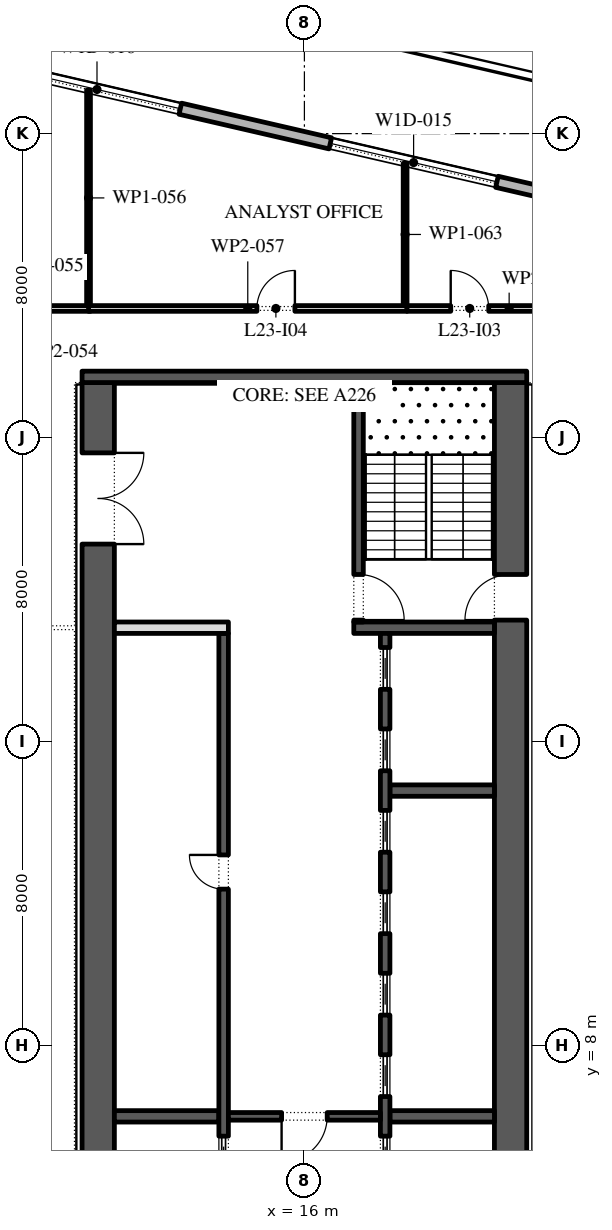
"""IFC4 building model, lengths in metres.
Left out: names, types, materials, properties, quantities, classifications, styles, units other than length and angle.
Written with IfcOpenShell. Run it as: python <this file> out.ifc"""

import sys

from ifc_helpers import new_model, si_unit, direction, frame, frame_2d, origin, place, context, subcontext, project, spatial, rectangle, extrude, element, fill, save


model = new_model("IFC4")
c1 = context("Model", 3, precision=1e-05, world=origin(), true_north=direction((0.0, 1.0)))
c2 = subcontext(c1, "Body", "Model", "MODEL_VIEW")
j1 = project(units=[si_unit("LENGTHUNIT", "METRE"), si_unit("PLANEANGLEUNIT", "RADIAN")], contexts=[c1])
p1 = place(None, origin())
s1 = spatial("IfcSite", under=j1, at=p1, CompositionType="ELEMENT")
p2 = place(p1, origin())
s2 = spatial("IfcBuilding", under=s1, at=p2, CompositionType="ELEMENT")
p3 = place(p2, frame((0.0, 0.0, 109.8)))
s3 = spatial("IfcBuildingStorey", under=s2, at=p3, CompositionType="ELEMENT", Elevation=109.8)
p4 = place(p3, frame((31.078, 28.421, 0.0), z_axis=(0.0, 0.0, 1.0), x_axis=(-0.974370456532, 0.224949357493, 0.0)))
e1 = element("IfcWall", 1, at=p4, inside=s3, PredefinedType="STANDARD", context=c2, shape_type="SweptSolid", body=[
    extrude(rectangle(XDim=51.0, YDim=0.3, at=frame_2d((25.5, 0.0))), origin(), (0.0, 0.0, 1.0), 4.0),
])
p5 = place(p4, frame((1.875, 0.0, 0.45)))
e2 = element("IfcOpeningElement", 2, at=p5, cuts=e1, PredefinedType="OPENING", context=c2, shape_type="SweptSolid", body=[
    extrude(rectangle(XDim=4.5, YDim=3.05, at=frame_2d((2.25, 1.525))), frame((0.0, 0.16, 0.0), z_axis=(0.0, -1.0, 0.0), x_axis=(1.0, 0.0, 0.0)), (0.0, 0.0, 1.0), 0.32),
])
p6 = place(p4, frame((10.275, 0.0, 0.45)))
e3 = element("IfcOpeningElement", 3, at=p6, cuts=e1, PredefinedType="OPENING", context=c2, shape_type="SweptSolid", body=[
    extrude(rectangle(XDim=4.5, YDim=2.875, at=frame_2d((2.25, 1.438))), frame((0.0, 0.16, 0.0), z_axis=(0.0, -1.0, 0.0), x_axis=(1.0, 0.0, 0.0)), (0.0, 0.0, 1.0), 0.32),
])
p7 = place(p4, frame((18.825, 0.0, 0.45)))
e4 = element("IfcOpeningElement", 4, at=p7, cuts=e1, PredefinedType="OPENING", context=c2, shape_type="SweptSolid", body=[
    extrude(rectangle(XDim=4.5, YDim=2.875, at=frame_2d((2.25, 1.438))), frame((0.0, 0.16, 0.0), z_axis=(0.0, -1.0, 0.0), x_axis=(1.0, 0.0, 0.0)), (0.0, 0.0, 1.0), 0.32),
])
p8 = place(p4, frame((27.075, 0.0, 0.0)))
e5 = element("IfcOpeningElement", 5, at=p8, cuts=e1, PredefinedType="OPENING", context=c2, shape_type="SweptSolid", body=[
    extrude(rectangle(XDim=2.4, YDim=3.2, at=frame_2d((1.2, 1.6))), frame((0.0, 0.16, 0.0), z_axis=(0.0, -1.0, 0.0), x_axis=(1.0, 0.0, 0.0)), (0.0, 0.0, 1.0), 0.32),
])
p9 = place(p4, frame((35.925, 0.0, 0.45)))
e6 = element("IfcOpeningElement", 6, at=p9, cuts=e1, PredefinedType="OPENING", context=c2, shape_type="SweptSolid", body=[
    extrude(rectangle(XDim=4.5, YDim=2.675, at=frame_2d((2.25, 1.337))), frame((0.0, 0.16, 0.0), z_axis=(0.0, -1.0, 0.0), x_axis=(1.0, 0.0, 0.0)), (0.0, 0.0, 1.0), 0.32),
])
p10 = place(p4, frame((44.475, 0.0, 0.45)))
e7 = element("IfcOpeningElement", 7, at=p10, cuts=e1, PredefinedType="OPENING", context=c2, shape_type="SweptSolid", body=[
    extrude(rectangle(XDim=4.5, YDim=3.05, at=frame_2d((2.25, 1.525))), frame((0.0, 0.16, 0.0), z_axis=(0.0, -1.0, 0.0), x_axis=(1.0, 0.0, 0.0)), (0.0, 0.0, 1.0), 0.32),
])
p11 = place(p3, frame((21.425, -2.45, 0.0), z_axis=(0.0, 0.0, 1.0), x_axis=(0.0, 1.0, 0.0)))
e8 = element("IfcWall", 8, at=p11, inside=s3, PredefinedType="SHEAR", context=c2, shape_type="SweptSolid", body=[
    extrude(rectangle(XDim=27.9, YDim=0.85, at=frame_2d((13.95, 0.0))), origin(), (0.0, 0.0, 1.0), 4.0),
])
p12 = place(p11, frame((5.05, 0.0, 0.0)))
e9 = element("IfcOpeningElement", 9, at=p12, cuts=e8, PredefinedType="OPENING", context=c2, shape_type="SweptSolid", body=[
    extrude(rectangle(XDim=1.2, YDim=2.1, at=frame_2d((0.6, 1.05))), frame((0.0, 0.435, 0.0), z_axis=(0.0, -1.0, 0.0), x_axis=(1.0, 0.0, 0.0)), (0.0, 0.0, 1.0), 0.87),
])
p13 = place(p11, frame((21.65, 0.0, 0.0)))
e10 = element("IfcOpeningElement", 10, at=p13, cuts=e8, PredefinedType="OPENING", context=c2, shape_type="SweptSolid", body=[
    extrude(rectangle(XDim=1.2, YDim=2.1, at=frame_2d((0.6, 1.05))), frame((0.0, 0.435, 0.0), z_axis=(0.0, -1.0, 0.0), x_axis=(1.0, 0.0, 0.0)), (0.0, 0.0, 1.0), 0.87),
])
p14 = place(p3, frame((10.575, -2.45, 0.0), z_axis=(0.0, 0.0, 1.0), x_axis=(0.0, 1.0, 0.0)))
e11 = element("IfcWall", 11, at=p14, inside=s3, PredefinedType="SHEAR", context=c2, shape_type="SweptSolid", body=[
    extrude(rectangle(XDim=27.9, YDim=0.85, at=frame_2d((13.95, 0.0))), origin(), (0.0, 0.0, 1.0), 4.0),
])
p15 = place(p14, frame((23.65, 0.0, 0.0)))
e12 = element("IfcOpeningElement", 12, at=p15, cuts=e11, PredefinedType="OPENING", context=c2, shape_type="SweptSolid", body=[
    extrude(rectangle(XDim=2.4, YDim=2.1, at=frame_2d((1.2, 1.05))), frame((0.0, 0.435, 0.0), z_axis=(0.0, -1.0, 0.0), x_axis=(1.0, 0.0, 0.0)), (0.0, 0.0, 1.0), 0.87),
])
p16 = place(p14, frame((1.087, 0.0, 0.0)))
e13 = element("IfcOpeningElement", 13, at=p16, cuts=e11, PredefinedType="OPENING", context=c2, shape_type="SweptSolid", body=[
    extrude(rectangle(XDim=0.9, YDim=2.1, at=frame_2d((0.45, 1.05))), frame((0.0, 0.435, 0.0), z_axis=(0.0, -1.0, 0.0), x_axis=(1.0, 0.0, 0.0)), (0.0, 0.0, 1.0), 0.87),
])
p17 = place(p14, frame((4.262, 0.0, 0.0)))
e14 = element("IfcOpeningElement", 14, at=p17, cuts=e11, PredefinedType="OPENING", context=c2, shape_type="SweptSolid", body=[
    extrude(rectangle(XDim=1.0, YDim=2.1, at=frame_2d((0.5, 1.05))), frame((0.0, 0.435, 0.0), z_axis=(0.0, -1.0, 0.0), x_axis=(1.0, 0.0, 0.0)), (0.0, 0.0, 1.0), 0.87),
])
p18 = place(p3, frame((10.15, 25.6, 0.0), z_axis=(0.0, 0.0, 1.0), x_axis=(1.0, 0.0, 0.0)))
e15 = element("IfcWall", 15, at=p18, inside=s3, PredefinedType="SHEAR", context=c2, shape_type="SweptSolid", body=[
    extrude(rectangle(XDim=11.7, YDim=0.3, at=frame_2d((5.85, 0.0))), origin(), (0.0, 0.0, 1.0), 4.0),
])
p19 = place(p3, frame((17.3, 19.0, 0.0), z_axis=(0.0, 0.0, 1.0), x_axis=(1.0, 0.0, 0.0)))
e16 = element("IfcWall", 16, at=p19, inside=s3, PredefinedType="SHEAR", context=c2, shape_type="SweptSolid", body=[
    extrude(rectangle(XDim=3.7, YDim=0.3, at=frame_2d((1.85, 0.0))), origin(), (0.0, 0.0, 1.0), 4.0),
])
p20 = place(p3, frame((17.425, 19.15, 0.0), z_axis=(0.0, 0.0, 1.0), x_axis=(0.0, 1.0, 0.0)))
e17 = element("IfcWall", 17, at=p20, inside=s3, PredefinedType="SHEAR", context=c2, shape_type="SweptSolid", body=[
    extrude(rectangle(XDim=6.3, YDim=0.25, at=frame_2d((3.15, 0.0))), origin(), (0.0, 0.0, 1.0), 4.0),
])
p21 = place(p20, frame((0.05, 0.0, 0.0)))
e18 = element("IfcOpeningElement", 18, at=p21, cuts=e17, PredefinedType="OPENING", context=c2, shape_type="SweptSolid", body=[
    extrude(rectangle(XDim=1.2, YDim=2.1, at=frame_2d((0.6, 1.05))), frame((0.0, 0.135, 0.0), z_axis=(0.0, -1.0, 0.0), x_axis=(1.0, 0.0, 0.0)), (0.0, 0.0, 1.0), 0.27),
])
for number, where, z_axis, x_axis in (
    (19, (18.25, 6.143, 0.0), (0.0, 0.0, 1.0), (1.0, 0.0, 0.0)),
    (20, (18.25, 14.714, 0.0), (0.0, 0.0, 1.0), (1.0, 0.0, 0.0)),
):
    element("IfcWall", number, at=place(p3, frame(where, z_axis=z_axis, x_axis=x_axis)), inside=s3, PredefinedType="SHEAR", context=c2, shape_type="SweptSolid", body=[
        extrude(rectangle(XDim=2.75, YDim=0.3, at=frame_2d((1.375, 0.0))), origin(), (0.0, 0.0, 1.0), 4.0),
    ])
p22 = place(p3, frame((18.125, 4.15, 0.0), z_axis=(0.0, 0.0, 1.0), x_axis=(0.0, 1.0, 0.0)))
e21 = element("IfcWall", 21, at=p22, inside=s3, PredefinedType="SHEAR", context=c2, shape_type="SweptSolid", body=[
    extrude(rectangle(XDim=14.7, YDim=0.25, at=frame_2d((7.35, 0.0))), origin(), (0.0, 0.0, 1.0), 4.0),
])
p23 = place(p22, frame((0.371, 0.0, 0.0)))
e22 = element("IfcOpeningElement", 22, at=p23, cuts=e21, PredefinedType="OPENING", context=c2, shape_type="SweptSolid", body=[
    extrude(rectangle(XDim=1.1, YDim=2.1, at=frame_2d((0.55, 1.05))), frame((0.0, 0.135, 0.0), z_axis=(0.0, -1.0, 0.0), x_axis=(1.0, 0.0, 0.0)), (0.0, 0.0, 1.0), 0.27),
])
p24 = place(p22, frame((2.514, 0.0, 0.0)))
e23 = element("IfcOpeningElement", 23, at=p24, cuts=e21, PredefinedType="OPENING", context=c2, shape_type="SweptSolid", body=[
    extrude(rectangle(XDim=1.1, YDim=2.1, at=frame_2d((0.55, 1.05))), frame((0.0, 0.135, 0.0), z_axis=(0.0, -1.0, 0.0), x_axis=(1.0, 0.0, 0.0)), (0.0, 0.0, 1.0), 0.27),
])
p25 = place(p22, frame((4.657, 0.0, 0.0)))
e24 = element("IfcOpeningElement", 24, at=p25, cuts=e21, PredefinedType="OPENING", context=c2, shape_type="SweptSolid", body=[
    extrude(rectangle(XDim=1.1, YDim=2.1, at=frame_2d((0.55, 1.05))), frame((0.0, 0.135, 0.0), z_axis=(0.0, -1.0, 0.0), x_axis=(1.0, 0.0, 0.0)), (0.0, 0.0, 1.0), 0.27),
])
p26 = place(p22, frame((6.8, 0.0, 0.0)))
e25 = element("IfcOpeningElement", 25, at=p26, cuts=e21, PredefinedType="OPENING", context=c2, shape_type="SweptSolid", body=[
    extrude(rectangle(XDim=1.1, YDim=2.1, at=frame_2d((0.55, 1.05))), frame((0.0, 0.135, 0.0), z_axis=(0.0, -1.0, 0.0), x_axis=(1.0, 0.0, 0.0)), (0.0, 0.0, 1.0), 0.27),
])
p27 = place(p22, frame((8.943, 0.0, 0.0)))
e26 = element("IfcOpeningElement", 26, at=p27, cuts=e21, PredefinedType="OPENING", context=c2, shape_type="SweptSolid", body=[
    extrude(rectangle(XDim=1.1, YDim=2.1, at=frame_2d((0.55, 1.05))), frame((0.0, 0.135, 0.0), z_axis=(0.0, -1.0, 0.0), x_axis=(1.0, 0.0, 0.0)), (0.0, 0.0, 1.0), 0.27),
])
p28 = place(p22, frame((11.086, 0.0, 0.0)))
e27 = element("IfcOpeningElement", 27, at=p28, cuts=e21, PredefinedType="OPENING", context=c2, shape_type="SweptSolid", body=[
    extrude(rectangle(XDim=1.1, YDim=2.1, at=frame_2d((0.55, 1.05))), frame((0.0, 0.135, 0.0), z_axis=(0.0, -1.0, 0.0), x_axis=(1.0, 0.0, 0.0)), (0.0, 0.0, 1.0), 0.27),
])
p29 = place(p22, frame((13.229, 0.0, 0.0)))
e28 = element("IfcOpeningElement", 28, at=p29, cuts=e21, PredefinedType="OPENING", context=c2, shape_type="SweptSolid", body=[
    extrude(rectangle(XDim=1.1, YDim=2.1, at=frame_2d((0.55, 1.05))), frame((0.0, 0.135, 0.0), z_axis=(0.0, -1.0, 0.0), x_axis=(1.0, 0.0, 0.0)), (0.0, 0.0, 1.0), 0.27),
])
p30 = place(p3, frame((11.0, 6.143, 0.0), z_axis=(0.0, 0.0, 1.0), x_axis=(1.0, 0.0, 0.0)))
e29 = element("IfcWall", 29, at=p30, inside=s3, PredefinedType="SHEAR", context=c2, shape_type="SweptSolid", body=[
    extrude(rectangle(XDim=2.75, YDim=0.3, at=frame_2d((1.375, 0.0))), origin(), (0.0, 0.0, 1.0), 4.0),
])
p31 = place(p3, frame((13.875, -2.45, 0.0), z_axis=(0.0, 0.0, 1.0), x_axis=(0.0, 1.0, 0.0)))
e30 = element("IfcWall", 30, at=p31, inside=s3, PredefinedType="SHEAR", context=c2, shape_type="SweptSolid", body=[
    extrude(rectangle(XDim=21.3, YDim=0.25, at=frame_2d((10.65, 0.0))), origin(), (0.0, 0.0, 1.0), 4.0),
])
p32 = place(p31, frame((14.571, 0.0, 0.0)))
e31 = element("IfcOpeningElement", 31, at=p32, cuts=e30, PredefinedType="OPENING", context=c2, shape_type="SweptSolid", body=[
    extrude(rectangle(XDim=0.9, YDim=2.1, at=frame_2d((0.45, 1.05))), frame((0.0, 0.135, 0.0), z_axis=(0.0, -1.0, 0.0), x_axis=(1.0, 0.0, 0.0)), (0.0, 0.0, 1.0), 0.27),
])
p33 = place(p31, frame((6.971, 0.0, 0.0)))
e32 = element("IfcOpeningElement", 32, at=p33, cuts=e30, PredefinedType="OPENING", context=c2, shape_type="SweptSolid", body=[
    extrude(rectangle(XDim=1.1, YDim=2.1, at=frame_2d((0.55, 1.05))), frame((0.0, 0.135, 0.0), z_axis=(0.0, -1.0, 0.0), x_axis=(1.0, 0.0, 0.0)), (0.0, 0.0, 1.0), 0.27),
])
p34 = place(p3, frame((11.0, 19.0, 0.0), z_axis=(0.0, 0.0, 1.0), x_axis=(1.0, 0.0, 0.0)))
e33 = element("IfcWall", 33, at=p34, inside=s3, PredefinedType="PARTITIONING", context=c2, shape_type="SweptSolid", body=[
    extrude(rectangle(XDim=3.0, YDim=0.3, at=frame_2d((1.5, 0.0))), origin(), (0.0, 0.0, 1.0), 4.0),
])
p35 = place(p3, frame((14.0, 6.143, 0.0), z_axis=(0.0, 0.0, 1.0), x_axis=(1.0, 0.0, 0.0)))
e34 = element("IfcWall", 34, at=p35, inside=s3, PredefinedType="SHEAR", context=c2, shape_type="SweptSolid", body=[
    extrude(rectangle(XDim=4.0, YDim=0.2, at=frame_2d((2.0, 0.0))), origin(), (0.0, 0.0, 1.0), 4.0),
])
p36 = place(p35, frame((1.4, 0.0, 0.0)))
e35 = element("IfcOpeningElement", 35, at=p36, cuts=e34, PredefinedType="OPENING", context=c2, shape_type="SweptSolid", body=[
    extrude(rectangle(XDim=1.2, YDim=2.1, at=frame_2d((0.6, 1.05))), frame((0.0, 0.11, 0.0), z_axis=(0.0, -1.0, 0.0), x_axis=(1.0, 0.0, 0.0)), (0.0, 0.0, 1.0), 0.22),
])
p37 = place(p3, frame((8.075, 27.4, 0.0), z_axis=(0.0, 0.0, 1.0), x_axis=(1.0, 0.0, 0.0)))
e36 = element("IfcWall", 36, at=p37, inside=s3, PredefinedType="PARTITIONING", context=c2, shape_type="SweptSolid", body=[
    extrude(rectangle(XDim=2.295, YDim=0.15, at=frame_2d((1.147, 0.0))), origin(), (0.0, 0.0, 1.0), 4.0),
])
p38 = place(p3, frame((10.32, 27.475, 0.0), z_axis=(0.0, 0.0, 1.0), x_axis=(0.0, 1.0, 0.0)))
e37 = element("IfcWall", 37, at=p38, inside=s3, PredefinedType="PARTITIONING", context=c2, shape_type="SweptSolid", body=[
    extrude(rectangle(XDim=5.667, YDim=0.1, at=frame_2d((2.833, 0.0))), origin(), (0.0, 0.0, 1.0), 4.0),
])
p39 = place(p3, frame((10.32, 27.4, 0.0), z_axis=(0.0, 0.0, 1.0), x_axis=(1.0, 0.0, 0.0)))
e38 = element("IfcWall", 38, at=p39, inside=s3, PredefinedType="PARTITIONING", context=c2, shape_type="SweptSolid", body=[
    extrude(rectangle(XDim=8.38, YDim=0.15, at=frame_2d((4.19, 0.0))), origin(), (0.0, 0.0, 1.0), 4.0),
])
p40 = place(p39, frame((4.43, 0.0, 0.0)))
e39 = element("IfcOpeningElement", 39, at=p40, cuts=e38, PredefinedType="OPENING", context=c2, shape_type="SweptSolid", body=[
    extrude(rectangle(XDim=1.0, YDim=2.1, at=frame_2d((0.5, 1.05))), frame((0.0, 0.085, 0.0), z_axis=(0.0, -1.0, 0.0), x_axis=(1.0, 0.0, 0.0)), (0.0, 0.0, 1.0), 0.17),
])
p41 = place(p3, frame((18.65, 27.475, 0.0), z_axis=(0.0, 0.0, 1.0), x_axis=(0.0, 1.0, 0.0)))
e40 = element("IfcWall", 40, at=p41, inside=s3, PredefinedType="PARTITIONING", context=c2, shape_type="SweptSolid", body=[
    extrude(rectangle(XDim=3.744, YDim=0.1, at=frame_2d((1.872, 0.0))), origin(), (0.0, 0.0, 1.0), 4.0),
])
p42 = place(p3, frame((18.7, 27.4, 0.0), z_axis=(0.0, 0.0, 1.0), x_axis=(1.0, 0.0, 0.0)))
e41 = element("IfcWall", 41, at=p42, inside=s3, PredefinedType="PARTITIONING", context=c2, shape_type="SweptSolid", body=[
    extrude(rectangle(XDim=5.375, YDim=0.15, at=frame_2d((2.688, 0.0))), origin(), (0.0, 0.0, 1.0), 4.0),
])
p43 = place(p42, frame((1.15, 0.0, 0.0)))
e42 = element("IfcOpeningElement", 42, at=p43, cuts=e41, PredefinedType="OPENING", context=c2, shape_type="SweptSolid", body=[
    extrude(rectangle(XDim=1.0, YDim=2.1, at=frame_2d((0.5, 1.05))), frame((0.0, 0.085, 0.0), z_axis=(0.0, -1.0, 0.0), x_axis=(1.0, 0.0, 0.0)), (0.0, 0.0, 1.0), 0.17),
])
p44 = place(p6, origin())
e43 = element("IfcWindow", 43, at=p44, inside=s3, PartitioningType="DOUBLE_PANEL_VERTICAL", PredefinedType="WINDOW", context=c2, shape_type="SweptSolid", body=[
    extrude(rectangle(XDim=4.5, YDim=2.875, at=frame_2d((2.25, 1.438))), frame((0.0, 0.03, 0.0), z_axis=(0.0, -1.0, 0.0), x_axis=(1.0, 0.0, 0.0)), (0.0, 0.0, 1.0), 0.06),
])
fill(e3, e43)
p45 = place(p7, origin())
e44 = element("IfcWindow", 44, at=p45, inside=s3, PartitioningType="DOUBLE_PANEL_VERTICAL", PredefinedType="WINDOW", context=c2, shape_type="SweptSolid", body=[
    extrude(rectangle(XDim=4.5, YDim=2.875, at=frame_2d((2.25, 1.438))), frame((0.0, 0.03, 0.0), z_axis=(0.0, -1.0, 0.0), x_axis=(1.0, 0.0, 0.0)), (0.0, 0.0, 1.0), 0.06),
])
fill(e4, e44)
p46 = place(p23, origin())
e45 = element("IfcDoor", 45, at=p46, inside=s3, OperationType="SLIDING_TO_LEFT", PredefinedType="DOOR", context=c2, shape_type="SweptSolid", body=[
    extrude(rectangle(XDim=1.1, YDim=2.1, at=frame_2d((0.55, 1.05))), frame((0.0, 0.025, 0.0), z_axis=(0.0, -1.0, 0.0), x_axis=(1.0, 0.0, 0.0)), (0.0, 0.0, 1.0), 0.05),
])
fill(e22, e45)
p47 = place(p24, origin())
e46 = element("IfcDoor", 46, at=p47, inside=s3, OperationType="SLIDING_TO_LEFT", PredefinedType="DOOR", context=c2, shape_type="SweptSolid", body=[
    extrude(rectangle(XDim=1.1, YDim=2.1, at=frame_2d((0.55, 1.05))), frame((0.0, 0.025, 0.0), z_axis=(0.0, -1.0, 0.0), x_axis=(1.0, 0.0, 0.0)), (0.0, 0.0, 1.0), 0.05),
])
fill(e23, e46)
p48 = place(p25, origin())
e47 = element("IfcDoor", 47, at=p48, inside=s3, OperationType="SLIDING_TO_LEFT", PredefinedType="DOOR", context=c2, shape_type="SweptSolid", body=[
    extrude(rectangle(XDim=1.1, YDim=2.1, at=frame_2d((0.55, 1.05))), frame((0.0, 0.025, 0.0), z_axis=(0.0, -1.0, 0.0), x_axis=(1.0, 0.0, 0.0)), (0.0, 0.0, 1.0), 0.05),
])
fill(e24, e47)
p49 = place(p26, origin())
e48 = element("IfcDoor", 48, at=p49, inside=s3, OperationType="SLIDING_TO_LEFT", PredefinedType="DOOR", context=c2, shape_type="SweptSolid", body=[
    extrude(rectangle(XDim=1.1, YDim=2.1, at=frame_2d((0.55, 1.05))), frame((0.0, 0.025, 0.0), z_axis=(0.0, -1.0, 0.0), x_axis=(1.0, 0.0, 0.0)), (0.0, 0.0, 1.0), 0.05),
])
fill(e25, e48)
p50 = place(p27, origin())
e49 = element("IfcDoor", 49, at=p50, inside=s3, OperationType="SLIDING_TO_LEFT", PredefinedType="DOOR", context=c2, shape_type="SweptSolid", body=[
    extrude(rectangle(XDim=1.1, YDim=2.1, at=frame_2d((0.55, 1.05))), frame((0.0, 0.025, 0.0), z_axis=(0.0, -1.0, 0.0), x_axis=(1.0, 0.0, 0.0)), (0.0, 0.0, 1.0), 0.05),
])
fill(e26, e49)
p51 = place(p28, origin())
e50 = element("IfcDoor", 50, at=p51, inside=s3, OperationType="SLIDING_TO_LEFT", PredefinedType="DOOR", context=c2, shape_type="SweptSolid", body=[
    extrude(rectangle(XDim=1.1, YDim=2.1, at=frame_2d((0.55, 1.05))), frame((0.0, 0.025, 0.0), z_axis=(0.0, -1.0, 0.0), x_axis=(1.0, 0.0, 0.0)), (0.0, 0.0, 1.0), 0.05),
])
fill(e27, e50)
p52 = place(p29, origin())
e51 = element("IfcDoor", 51, at=p52, inside=s3, OperationType="SLIDING_TO_LEFT", PredefinedType="DOOR", context=c2, shape_type="SweptSolid", body=[
    extrude(rectangle(XDim=1.1, YDim=2.1, at=frame_2d((0.55, 1.05))), frame((0.0, 0.025, 0.0), z_axis=(0.0, -1.0, 0.0), x_axis=(1.0, 0.0, 0.0)), (0.0, 0.0, 1.0), 0.05),
])
fill(e28, e51)
p53 = place(p32, origin())
e52 = element("IfcDoor", 52, at=p53, inside=s3, OperationType="SINGLE_SWING_LEFT", PredefinedType="DOOR", context=c2, shape_type="SweptSolid", body=[
    extrude(rectangle(XDim=0.9, YDim=2.1, at=frame_2d((0.45, 1.05))), frame((0.0, 0.125, 0.0), z_axis=(0.0, -1.0, 0.0), x_axis=(1.0, 0.0, 0.0)), (0.0, 0.0, 1.0), 0.05),
])
fill(e31, e52)
p54 = place(p33, origin())
e53 = element("IfcDoor", 53, at=p54, inside=s3, OperationType="SLIDING_TO_LEFT", PredefinedType="DOOR", context=c2, shape_type="SweptSolid", body=[
    extrude(rectangle(XDim=1.1, YDim=2.1, at=frame_2d((0.55, 1.05))), frame((0.0, 0.025, 0.0), z_axis=(0.0, -1.0, 0.0), x_axis=(1.0, 0.0, 0.0)), (0.0, 0.0, 1.0), 0.05),
])
fill(e32, e53)
p55 = place(p36, frame((1.2, 0.0, 0.0), z_axis=(0.0, 0.0, 1.0), x_axis=(-1.0, 0.0, 0.0)))
e54 = element("IfcDoor", 54, at=p55, inside=s3, OperationType="SINGLE_SWING_LEFT", PredefinedType="DOOR", context=c2, shape_type="SweptSolid", body=[
    extrude(rectangle(XDim=1.2, YDim=2.1, at=frame_2d((0.6, 1.05))), frame((0.0, 0.025, 0.0), z_axis=(0.0, -1.0, 0.0), x_axis=(1.0, 0.0, 0.0)), (0.0, 0.0, 1.0), 0.05),
])
fill(e35, e54)
p56 = place(p15, frame((2.4, 0.0, 0.0), z_axis=(0.0, 0.0, 1.0), x_axis=(-1.0, 0.0, 0.0)))
e55 = element("IfcDoor", 55, at=p56, inside=s3, OperationType="DOUBLE_DOOR_SINGLE_SWING", PredefinedType="DOOR", context=c2, shape_type="SweptSolid", body=[
    extrude(rectangle(XDim=2.4, YDim=2.1, at=frame_2d((1.2, 1.05))), frame((0.0, 0.025, 0.0), z_axis=(0.0, -1.0, 0.0), x_axis=(1.0, 0.0, 0.0)), (0.0, 0.0, 1.0), 0.05),
])
fill(e12, e55)
p57 = place(p21, frame((1.2, 0.0, 0.0), z_axis=(0.0, 0.0, 1.0), x_axis=(-1.0, 0.0, 0.0)))
e56 = element("IfcDoor", 56, at=p57, inside=s3, OperationType="SINGLE_SWING_LEFT", PredefinedType="DOOR", context=c2, shape_type="SweptSolid", body=[
    extrude(rectangle(XDim=1.2, YDim=2.1, at=frame_2d((0.6, 1.05))), frame((0.0, 0.025, 0.0), z_axis=(0.0, -1.0, 0.0), x_axis=(1.0, 0.0, 0.0)), (0.0, 0.0, 1.0), 0.05),
])
fill(e18, e56)
p58 = place(p13, origin())
e57 = element("IfcDoor", 57, at=p58, inside=s3, OperationType="SINGLE_SWING_RIGHT", PredefinedType="DOOR", context=c2, shape_type="SweptSolid", body=[
    extrude(rectangle(XDim=1.2, YDim=2.1, at=frame_2d((0.6, 1.05))), frame((0.0, 0.025, 0.0), z_axis=(0.0, -1.0, 0.0), x_axis=(1.0, 0.0, 0.0)), (0.0, 0.0, 1.0), 0.05),
])
fill(e10, e57)
p59 = place(p43, origin())
e58 = element("IfcDoor", 58, at=p59, inside=s3, OperationType="SINGLE_SWING_RIGHT", PredefinedType="DOOR", context=c2, shape_type="SweptSolid", body=[
    extrude(rectangle(XDim=1.0, YDim=2.1, at=frame_2d((0.5, 1.05))), frame((0.0, 0.025, 0.0), z_axis=(0.0, -1.0, 0.0), x_axis=(1.0, 0.0, 0.0)), (0.0, 0.0, 1.0), 0.05),
])
fill(e42, e58)
p60 = place(p40, origin())
e59 = element("IfcDoor", 59, at=p60, inside=s3, OperationType="SINGLE_SWING_LEFT", PredefinedType="DOOR", context=c2, shape_type="SweptSolid", body=[
    extrude(rectangle(XDim=1.0, YDim=2.1, at=frame_2d((0.5, 1.05))), frame((0.0, 0.025, 0.0), z_axis=(0.0, -1.0, 0.0), x_axis=(1.0, 0.0, 0.0)), (0.0, 0.0, 1.0), 0.05),
])
fill(e39, e59)
save(model, sys.argv[1])
